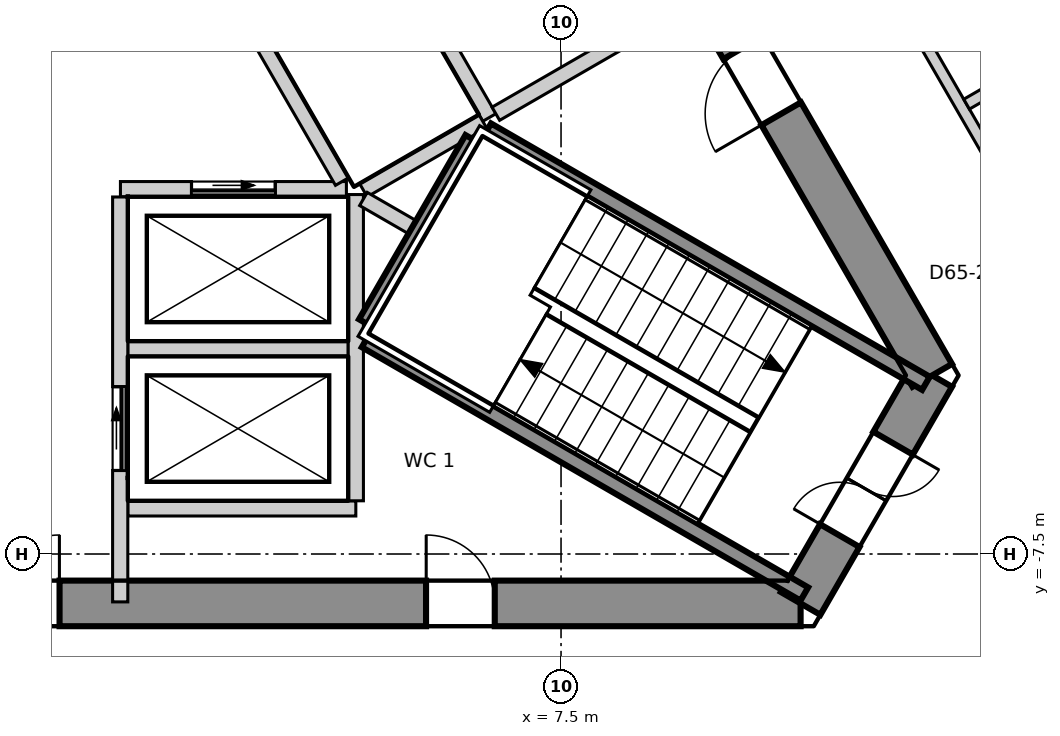
"""IFC4 building model, lengths in metres.
Left out: names, types, materials, properties, quantities, classifications, styles, units other than length and angle.
Written with IfcOpenShell. Run it as: python <this file> out.ifc"""

import sys

from ifc_helpers import new_model, si_unit, direction, frame, frame_2d, origin, place, context, subcontext, project, spatial, polyline, rectangle, outline, extrude, element, fill, save


model = new_model("IFC4")
c1 = context("Model", 3, precision=1e-05, world=origin(), true_north=direction((0.0, 1.0)))
c2 = subcontext(c1, "Body", "Model", "MODEL_VIEW")
j1 = project(units=[si_unit("LENGTHUNIT", "METRE"), si_unit("PLANEANGLEUNIT", "RADIAN")], contexts=[c1])
p1 = place(None, origin())
s1 = spatial("IfcSite", under=j1, at=p1, CompositionType="ELEMENT")
p2 = place(p1, origin())
s2 = spatial("IfcBuilding", under=s1, at=p2, CompositionType="ELEMENT")
p3 = place(p2, frame((0.0, 0.0, 279.1)))
s3 = spatial("IfcBuildingStorey", under=s2, at=p3, CompositionType="ELEMENT", Elevation=279.1)
p4 = place(p3, frame((-10.652, -8.15, -0.3), z_axis=(0.0, 0.0, 1.0), x_axis=(1.0, 0.0, 0.0)))
e1 = element("IfcWall", 1, at=p4, inside=s3, PredefinedType="SHEAR", context=c2, shape_type="SweptSolid", body=[
    extrude(outline(polyline([(-0.173, -0.3), (1.795, -0.3), (3.763, -0.3), (5.731, -0.3), (7.7, -0.3), (9.668, -0.3), (11.636, -0.3), (13.604, -0.3), (15.573, -0.3), (17.541, -0.3), (19.509, -0.3), (21.477, -0.3), (21.131, 0.3), (19.226, 0.3), (17.321, 0.3), (15.415, 0.3), (13.51, 0.3), (11.605, 0.3), (9.699, 0.3), (7.794, 0.3), (5.889, 0.3), (3.984, 0.3), (2.078, 0.3), (0.173, 0.3), (-0.173, -0.3)])), origin(), (0.0, 0.0, 1.0), 3.6),
])
p5 = place(p4, frame((9.752, 0.0, 0.3)))
e2 = element("IfcOpeningElement", 2, at=p5, cuts=e1, PredefinedType="OPENING", context=c2, shape_type="SweptSolid", body=[
    extrude(rectangle(XDim=1.8, YDim=2.1, at=frame_2d((0.9, 1.05))), frame((0.0, 0.31, 0.0), z_axis=(0.0, -1.0, 0.0), x_axis=(1.0, 0.0, 0.0)), (0.0, 0.0, 1.0), 0.62),
])
p6 = place(p4, frame((4.026, 0.0, 0.3)))
e3 = element("IfcOpeningElement", 3, at=p6, cuts=e1, PredefinedType="OPENING", context=c2, shape_type="SweptSolid", body=[
    extrude(rectangle(XDim=0.9, YDim=2.1, at=frame_2d((0.45, 1.05))), frame((0.0, 0.31, 0.0), z_axis=(0.0, -1.0, 0.0), x_axis=(1.0, 0.0, 0.0)), (0.0, 0.0, 1.0), 0.62),
])
p7 = place(p4, frame((16.378, 0.0, 0.3)))
e4 = element("IfcOpeningElement", 4, at=p7, cuts=e1, PredefinedType="OPENING", context=c2, shape_type="SweptSolid", body=[
    extrude(rectangle(XDim=0.9, YDim=2.1, at=frame_2d((0.45, 1.05))), frame((0.0, 0.31, 0.0), z_axis=(0.0, -1.0, 0.0), x_axis=(1.0, 0.0, 0.0)), (0.0, 0.0, 1.0), 0.62),
])
p8 = place(p3, frame((10.652, -8.15, -0.3), z_axis=(0.0, 0.0, 1.0), x_axis=(0.49997462182, 0.866040055388, 0.0)))
e5 = element("IfcWall", 5, at=p8, inside=s3, PredefinedType="SHEAR", context=c2, shape_type="SweptSolid", body=[
    extrude(outline(polyline([(-0.173, -0.3), (1.732, -0.301), (3.638, -0.301), (3.291, 0.3), (1.732, 0.3), (0.173, 0.3), (-0.173, -0.3)])), origin(), (0.0, 0.0, 1.0), 3.6),
])
p9 = place(p8, frame((1.032, 0.0, 0.3)))
e6 = element("IfcOpeningElement", 6, at=p9, cuts=e5, PredefinedType="OPENING", context=c2, shape_type="SweptSolid", body=[
    extrude(rectangle(XDim=1.4, YDim=2.1, at=frame_2d((0.7, 1.05))), frame((0.0, 0.31, 0.0), z_axis=(0.0, -1.0, 0.0), x_axis=(1.0, 0.0, 0.0)), (0.0, 0.0, 1.0), 0.621),
])
p10 = place(p3, frame((12.384, -5.15, -0.3), z_axis=(0.0, 0.0, 1.0), x_axis=(-0.500000539815, 0.866025092122, 0.0)))
e7 = element("IfcWall", 7, at=p10, inside=s3, PredefinedType="SHEAR", context=c2, shape_type="SweptSolid", body=[
    extrude(outline(polyline([(-0.173, -0.301), (1.795, -0.301), (3.763, -0.301), (5.731, -0.301), (7.7, -0.301), (9.668, -0.301), (11.636, -0.301), (13.604, -0.3), (15.573, -0.3), (17.541, -0.3), (19.509, -0.3), (21.477, -0.3), (21.131, 0.3), (19.226, 0.3), (17.321, 0.3), (15.415, 0.3), (13.51, 0.3), (11.605, 0.3), (9.699, 0.3), (7.794, 0.3), (5.889, 0.3), (3.984, 0.3), (2.078, 0.3), (0.173, 0.3), (-0.173, -0.301)])), origin(), (0.0, 0.0, 1.0), 3.6),
])
p11 = place(p10, frame((16.378, 0.0, 0.3)))
e8 = element("IfcOpeningElement", 8, at=p11, cuts=e7, PredefinedType="OPENING", context=c2, shape_type="SweptSolid", body=[
    extrude(rectangle(XDim=0.9, YDim=2.1, at=frame_2d((0.45, 1.05))), frame((0.0, 0.31, 0.0), z_axis=(0.0, -1.0, 0.0), x_axis=(1.0, 0.0, 0.0)), (0.0, 0.0, 1.0), 0.621),
])
p12 = place(p10, frame((3.976, 0.0, 0.3)))
e9 = element("IfcOpeningElement", 9, at=p12, cuts=e7, PredefinedType="OPENING", context=c2, shape_type="SweptSolid", body=[
    extrude(rectangle(XDim=1.0, YDim=2.1, at=frame_2d((0.5, 1.05))), frame((0.0, 0.31, 0.0), z_axis=(0.0, -1.0, 0.0), x_axis=(1.0, 0.0, 0.0)), (0.0, 0.0, 1.0), 0.621),
])
p13 = place(p3, frame((25.791, -11.962, 0.0), z_axis=(0.0, 0.0, 1.0), x_axis=(-0.500006870765, 0.86602143691, 0.0)))
e10 = element("IfcWall", 10, at=p13, inside=s3, PredefinedType="ELEMENTEDWALL", context=c2, shape_type="SweptSolid", body=[
    extrude(rectangle(XDim=46.49, YDim=0.2, at=frame_2d((23.245, 0.0))), origin(), (0.0, 0.0, 1.0), 3.3),
])
p14 = place(p13, frame((2.197, 0.0, 0.9)))
e11 = element("IfcOpeningElement", 11, at=p14, cuts=e10, PredefinedType="OPENING", context=c2, shape_type="SweptSolid", body=[
    extrude(rectangle(XDim=3.7, YDim=2.2, at=frame_2d((1.85, 1.1))), frame((0.0, 0.11, 0.0), z_axis=(0.0, -1.0, 0.0), x_axis=(1.0, 0.0, 0.0)), (0.0, 0.0, 1.0), 0.22),
])
p15 = place(p13, frame((7.685, 0.0, 0.9)))
e12 = element("IfcOpeningElement", 12, at=p15, cuts=e10, PredefinedType="OPENING", context=c2, shape_type="SweptSolid", body=[
    extrude(rectangle(XDim=3.7, YDim=2.2, at=frame_2d((1.85, 1.1))), frame((0.0, 0.11, 0.0), z_axis=(0.0, -1.0, 0.0), x_axis=(1.0, 0.0, 0.0)), (0.0, 0.0, 1.0), 0.22),
])
p16 = place(p13, frame((13.173, 0.0, 0.9)))
e13 = element("IfcOpeningElement", 13, at=p16, cuts=e10, PredefinedType="OPENING", context=c2, shape_type="SweptSolid", body=[
    extrude(rectangle(XDim=3.7, YDim=2.2, at=frame_2d((1.85, 1.1))), frame((0.0, 0.11, 0.0), z_axis=(0.0, -1.0, 0.0), x_axis=(1.0, 0.0, 0.0)), (0.0, 0.0, 1.0), 0.22),
])
p17 = place(p13, frame((18.661, 0.0, 0.9)))
e14 = element("IfcOpeningElement", 14, at=p17, cuts=e10, PredefinedType="OPENING", context=c2, shape_type="SweptSolid", body=[
    extrude(rectangle(XDim=3.7, YDim=2.2, at=frame_2d((1.85, 1.1))), frame((0.0, 0.11, 0.0), z_axis=(0.0, -1.0, 0.0), x_axis=(1.0, 0.0, 0.0)), (0.0, 0.0, 1.0), 0.22),
])
p18 = place(p13, frame((24.149, 0.0, 0.9)))
e15 = element("IfcOpeningElement", 15, at=p18, cuts=e10, PredefinedType="OPENING", context=c2, shape_type="SweptSolid", body=[
    extrude(rectangle(XDim=3.7, YDim=2.2, at=frame_2d((1.85, 1.1))), frame((0.0, 0.11, 0.0), z_axis=(0.0, -1.0, 0.0), x_axis=(1.0, 0.0, 0.0)), (0.0, 0.0, 1.0), 0.22),
])
p19 = place(p13, frame((29.637, 0.0, 0.9)))
e16 = element("IfcOpeningElement", 16, at=p19, cuts=e10, PredefinedType="OPENING", context=c2, shape_type="SweptSolid", body=[
    extrude(rectangle(XDim=3.7, YDim=2.2, at=frame_2d((1.85, 1.1))), frame((0.0, 0.11, 0.0), z_axis=(0.0, -1.0, 0.0), x_axis=(1.0, 0.0, 0.0)), (0.0, 0.0, 1.0), 0.22),
])
p20 = place(p13, frame((35.125, 0.0, 0.9)))
e17 = element("IfcOpeningElement", 17, at=p20, cuts=e10, PredefinedType="OPENING", context=c2, shape_type="SweptSolid", body=[
    extrude(rectangle(XDim=3.7, YDim=2.2, at=frame_2d((1.85, 1.1))), frame((0.0, 0.11, 0.0), z_axis=(0.0, -1.0, 0.0), x_axis=(1.0, 0.0, 0.0)), (0.0, 0.0, 1.0), 0.22),
])
p21 = place(p13, frame((40.613, 0.0, 0.9)))
e18 = element("IfcOpeningElement", 18, at=p21, cuts=e10, PredefinedType="OPENING", context=c2, shape_type="SweptSolid", body=[
    extrude(rectangle(XDim=3.7, YDim=2.2, at=frame_2d((1.85, 1.1))), frame((0.0, 0.11, 0.0), z_axis=(0.0, -1.0, 0.0), x_axis=(1.0, 0.0, 0.0)), (0.0, 0.0, 1.0), 0.22),
])
p22 = place(p3, frame((0.075, 20.37, 0.0), z_axis=(0.0, 0.0, 1.0), x_axis=(0.500003985697, -0.866023102629, 0.0)))
e19 = element("IfcWall", 19, at=p22, inside=s3, PredefinedType="PARTITIONING", context=c2, shape_type="SweptSolid", body=[
    extrude(rectangle(XDim=35.206, YDim=0.15, at=frame_2d((17.603, 0.0))), origin(), (0.0, 0.0, 1.0), 3.3),
])
p23 = place(p22, frame((31.506, 0.0, 0.0)))
e20 = element("IfcOpeningElement", 20, at=p23, cuts=e19, PredefinedType="OPENING", context=c2, shape_type="SweptSolid", body=[
    extrude(rectangle(XDim=1.0, YDim=2.1, at=frame_2d((0.5, 1.05))), frame((0.0, 0.085, 0.0), z_axis=(0.0, -1.0, 0.0), x_axis=(1.0, 0.0, 0.0)), (0.0, 0.0, 1.0), 0.17),
])
p24 = place(p22, frame((26.529, 0.0, 0.0)))
e21 = element("IfcOpeningElement", 21, at=p24, cuts=e19, PredefinedType="OPENING", context=c2, shape_type="SweptSolid", body=[
    extrude(rectangle(XDim=1.0, YDim=2.1, at=frame_2d((0.5, 1.05))), frame((0.0, 0.085, 0.0), z_axis=(0.0, -1.0, 0.0), x_axis=(1.0, 0.0, 0.0)), (0.0, 0.0, 1.0), 0.17),
])
p25 = place(p22, frame((19.442, 0.0, 0.0)))
e22 = element("IfcOpeningElement", 22, at=p25, cuts=e19, PredefinedType="OPENING", context=c2, shape_type="SweptSolid", body=[
    extrude(rectangle(XDim=1.0, YDim=2.1, at=frame_2d((0.5, 1.05))), frame((0.0, 0.085, 0.0), z_axis=(0.0, -1.0, 0.0), x_axis=(1.0, 0.0, 0.0)), (0.0, 0.0, 1.0), 0.17),
])
p26 = place(p22, frame((8.254, 0.0, 0.0)))
e23 = element("IfcOpeningElement", 23, at=p26, cuts=e19, PredefinedType="OPENING", context=c2, shape_type="SweptSolid", body=[
    extrude(rectangle(XDim=1.0, YDim=2.1, at=frame_2d((0.5, 1.05))), frame((0.0, 0.085, 0.0), z_axis=(0.0, -1.0, 0.0), x_axis=(1.0, 0.0, 0.0)), (0.0, 0.0, 1.0), 0.17),
])
p27 = place(p22, frame((13.754, 0.0, 0.0)))
e24 = element("IfcOpeningElement", 24, at=p27, cuts=e19, PredefinedType="OPENING", context=c2, shape_type="SweptSolid", body=[
    extrude(rectangle(XDim=0.9, YDim=2.1, at=frame_2d((0.45, 1.05))), frame((0.0, 0.085, 0.0), z_axis=(0.0, -1.0, 0.0), x_axis=(1.0, 0.0, 0.0)), (0.0, 0.0, 1.0), 0.17),
])
p28 = place(p22, frame((11.554, 0.0, 0.0)))
e25 = element("IfcOpeningElement", 25, at=p28, cuts=e19, PredefinedType="OPENING", context=c2, shape_type="SweptSolid", body=[
    extrude(rectangle(XDim=0.9, YDim=2.1, at=frame_2d((0.45, 1.05))), frame((0.0, 0.085, 0.0), z_axis=(0.0, -1.0, 0.0), x_axis=(1.0, 0.0, 0.0)), (0.0, 0.0, 1.0), 0.17),
])
p29 = place(p22, frame((2.777, 0.0, 0.0)))
e26 = element("IfcOpeningElement", 26, at=p29, cuts=e19, PredefinedType="OPENING", context=c2, shape_type="SweptSolid", body=[
    extrude(rectangle(XDim=1.0, YDim=2.1, at=frame_2d((0.5, 1.05))), frame((0.0, 0.085, 0.0), z_axis=(0.0, -1.0, 0.0), x_axis=(1.0, 0.0, 0.0)), (0.0, 0.0, 1.0), 0.17),
])
p30 = place(p3, frame((12.836, -1.582, 0.0), z_axis=(0.0, 0.0, 1.0), x_axis=(0.865965520905, 0.500103705848, 0.0)))
e27 = element("IfcWall", 27, at=p30, inside=s3, PredefinedType="PARTITIONING", context=c2, shape_type="SweptSolid", body=[
    extrude(rectangle(XDim=2.55, YDim=0.15, at=frame_2d((1.275, 0.0))), origin(), (0.0, 0.0, 1.0), 3.3),
])
p31 = place(p30, frame((0.775, 0.0, 0.0)))
e28 = element("IfcOpeningElement", 28, at=p31, cuts=e27, PredefinedType="OPENING", context=c2, shape_type="SweptSolid", body=[
    extrude(rectangle(XDim=0.9, YDim=2.1, at=frame_2d((0.45, 1.05))), frame((0.0, 0.085, 0.0), z_axis=(0.0, -1.0, 0.0), x_axis=(1.0, 0.0, 0.0)), (0.0, 0.0, 1.0), 0.17),
])
p32 = place(p3, frame((1.8, -4.8, 0.0), z_axis=(0.0, 0.0, 1.0), x_axis=(1.0, 0.0, 0.0)))
e29 = element("IfcWall", 29, at=p32, inside=s3, PredefinedType="SOLIDWALL", context=c2, shape_type="SweptSolid", body=[
    extrude(rectangle(XDim=2.9, YDim=0.2, at=frame_2d((1.45, 0.0))), origin(), (0.0, 0.0, 1.0), 3.3),
])
p33 = place(p3, frame((1.8, -6.9, 0.0), z_axis=(0.0, 0.0, 1.0), x_axis=(1.0, 0.0, 0.0)))
e30 = element("IfcWall", 30, at=p33, inside=s3, PredefinedType="SOLIDWALL", context=c2, shape_type="SweptSolid", body=[
    extrude(rectangle(XDim=3.0, YDim=0.2, at=frame_2d((1.5, 0.0))), origin(), (0.0, 0.0, 1.0), 3.3),
])
p34 = place(p3, frame((1.703, -2.7, 0.0), z_axis=(0.0, 0.0, 1.0), x_axis=(1.0, 0.0, 0.0)))
e31 = element("IfcWall", 31, at=p34, inside=s3, PredefinedType="SOLIDWALL", context=c2, shape_type="SweptSolid", body=[
    extrude(rectangle(XDim=2.973, YDim=0.2, at=frame_2d((1.487, 0.0))), origin(), (0.0, 0.0, 1.0), 3.3),
])
p35 = place(p34, frame((0.936, 0.0, 0.0)))
e32 = element("IfcOpeningElement", 32, at=p35, cuts=e31, PredefinedType="OPENING", context=c2, shape_type="SweptSolid", body=[
    extrude(rectangle(XDim=1.1, YDim=2.1, at=frame_2d((0.55, 1.05))), frame((0.0, 0.11, 0.0), z_axis=(0.0, -1.0, 0.0), x_axis=(1.0, 0.0, 0.0)), (0.0, 0.0, 1.0), 0.22),
])
p36 = place(p3, frame((3.19, -0.125, 0.0), z_axis=(0.0, 0.0, 1.0), x_axis=(0.499988658015, -0.866031951983, 0.0)))
e33 = element("IfcWall", 33, at=p36, inside=s3, PredefinedType="SOLIDWALL", context=c2, shape_type="SweptSolid", body=[
    extrude(rectangle(XDim=2.858, YDim=0.2, at=frame_2d((1.429, 0.0))), origin(), (0.0, 0.0, 1.0), 3.3),
])
p37 = place(p3, frame((1.7, -8.13, 0.0), z_axis=(0.0, 0.0, 1.0), x_axis=(0.0, 1.0, 0.0)))
e34 = element("IfcWall", 34, at=p37, inside=s3, PredefinedType="SOLIDWALL", context=c2, shape_type="SweptSolid", body=[
    extrude(rectangle(XDim=5.327, YDim=0.2, at=frame_2d((2.664, 0.0))), origin(), (0.0, 0.0, 1.0), 3.3),
])
p38 = place(p37, frame((1.73, 0.0, 0.0)))
e35 = element("IfcOpeningElement", 35, at=p38, cuts=e34, PredefinedType="OPENING", context=c2, shape_type="SweptSolid", body=[
    extrude(rectangle(XDim=1.1, YDim=2.1, at=frame_2d((0.55, 1.05))), frame((0.0, 0.11, 0.0), z_axis=(0.0, -1.0, 0.0), x_axis=(1.0, 0.0, 0.0)), (0.0, 0.0, 1.0), 0.22),
])
p39 = place(p3, frame((4.8, -6.8, 0.0), z_axis=(0.0, 0.0, 1.0), x_axis=(0.0, 1.0, 0.0)))
e36 = element("IfcWall", 36, at=p39, inside=s3, PredefinedType="SOLIDWALL", context=c2, shape_type="SweptSolid", body=[
    extrude(rectangle(XDim=4.029, YDim=0.2, at=frame_2d((2.015, 0.0))), origin(), (0.0, 0.0, 1.0), 3.3),
])
p40 = place(p3, frame((5.057, 0.841, 0.0), z_axis=(0.0, 0.0, 1.0), x_axis=(0.499990139034, -0.866031096941, 0.0)))
e37 = element("IfcWall", 37, at=p40, inside=s3, PredefinedType="SOLIDWALL", context=c2, shape_type="SweptSolid", body=[
    extrude(rectangle(XDim=3.0, YDim=0.2, at=frame_2d((1.5, 0.0))), origin(), (0.0, 0.0, 1.0), 3.3),
])
p41 = place(p3, frame((4.9, -2.714, 0.0), z_axis=(0.0, 0.0, 1.0), x_axis=(0.865846928409, 0.500309001083, 0.0)))
e38 = element("IfcWall", 38, at=p41, inside=s3, PredefinedType="SOLIDWALL", context=c2, shape_type="SweptSolid", body=[
    extrude(rectangle(XDim=1.813, YDim=0.2, at=frame_2d((0.907, 0.0))), origin(), (0.0, 0.0, 1.0), 3.3),
])
p42 = place(p3, frame((4.9, -2.829, 0.0), z_axis=(0.0, 0.0, 1.0), x_axis=(0.866273177064, -0.499570598314, 0.0)))
e39 = element("IfcWall", 39, at=p42, inside=s3, PredefinedType="SOLIDWALL", context=c2, shape_type="SweptSolid", body=[
    extrude(rectangle(XDim=0.742, YDim=0.2, at=frame_2d((0.371, 0.0))), origin(), (0.0, 0.0, 1.0), 3.3),
])
p43 = place(p3, frame((6.642, -1.708, 0.0), z_axis=(0.0, 0.0, 1.0), x_axis=(0.866043441391, 0.499968756647, 0.0)))
e40 = element("IfcWall", 40, at=p43, inside=s3, PredefinedType="SOLIDWALL", context=c2, shape_type="SweptSolid", body=[
    extrude(rectangle(XDim=2.002, YDim=0.2, at=frame_2d((1.001, 0.0))), origin(), (0.0, 0.0, 1.0), 3.3),
])
p44 = place(p3, frame((4.929, -4.462, 0.0), z_axis=(0.0, 0.0, 1.0), x_axis=(0.500200581029, 0.865909567298, 0.0)))
e41 = element("IfcWall", 41, at=p44, inside=s3, PredefinedType="SOLIDWALL", context=c2, shape_type="SweptSolid", body=[
    extrude(rectangle(XDim=2.799, YDim=0.2, at=frame_2d((1.399, 0.0))), origin(), (0.0, 0.0, 1.0), 3.3),
])
p45 = place(p3, frame((6.529, -1.922, 0.0), z_axis=(0.0, 0.0, 1.0), x_axis=(0.866068467981, -0.499925403204, 0.0)))
e42 = element("IfcWall", 42, at=p45, inside=s3, PredefinedType="SOLIDWALL", context=c2, shape_type="SweptSolid", body=[
    extrude(rectangle(XDim=6.665, YDim=0.2, at=frame_2d((3.332, 0.0))), origin(), (0.0, 0.0, 1.0), 3.3),
])
p46 = place(p3, frame((4.929, -4.693, 0.0), z_axis=(0.0, 0.0, 1.0), x_axis=(0.866005022404, -0.500035299925, 0.0)))
e43 = element("IfcWall", 43, at=p46, inside=s3, PredefinedType="SOLIDWALL", context=c2, shape_type="SweptSolid", body=[
    extrude(rectangle(XDim=6.665, YDim=0.2, at=frame_2d((3.333, 0.0))), origin(), (0.0, 0.0, 1.0), 3.3),
])
p47 = place(p35, origin())
e44 = element("IfcDoor", 44, at=p47, inside=s3, OperationType="SLIDING_TO_LEFT", PredefinedType="DOOR", context=c2, shape_type="SweptSolid", body=[
    extrude(rectangle(XDim=1.1, YDim=2.1, at=frame_2d((0.55, 1.05))), frame((0.0, 0.025, 0.0), z_axis=(0.0, -1.0, 0.0), x_axis=(1.0, 0.0, 0.0)), (0.0, 0.0, 1.0), 0.05),
])
fill(e32, e44)
p48 = place(p38, origin())
e45 = element("IfcDoor", 45, at=p48, inside=s3, OperationType="SLIDING_TO_LEFT", PredefinedType="DOOR", context=c2, shape_type="SweptSolid", body=[
    extrude(rectangle(XDim=1.1, YDim=2.1, at=frame_2d((0.55, 1.05))), frame((0.0, 0.025, 0.0), z_axis=(0.0, -1.0, 0.0), x_axis=(1.0, 0.0, 0.0)), (0.0, 0.0, 1.0), 0.05),
])
fill(e35, e45)
p49 = place(p5, origin())
e46 = element("IfcDoor", 46, at=p49, inside=s3, OperationType="DOUBLE_DOOR_SINGLE_SWING", PredefinedType="DOOR", context=c2, shape_type="SweptSolid", body=[
    extrude(rectangle(XDim=1.8, YDim=2.1, at=frame_2d((0.9, 1.05))), frame((0.0, 0.025, 0.0), z_axis=(0.0, -1.0, 0.0), x_axis=(1.0, 0.0, 0.0)), (0.0, 0.0, 1.0), 0.05),
])
fill(e2, e46)
p50 = place(p9, origin())
e47 = element("IfcDoor", 47, at=p50, inside=s3, OperationType="DOUBLE_DOOR_SINGLE_SWING", PredefinedType="DOOR", context=c2, shape_type="SweptSolid", body=[
    extrude(rectangle(XDim=1.4, YDim=2.1, at=frame_2d((0.7, 1.05))), frame((0.0, 0.025, 0.0), z_axis=(0.0, -1.0, 0.0), x_axis=(1.0, 0.0, 0.0)), (0.0, 0.0, 1.0), 0.05),
])
fill(e6, e47)
p51 = place(p7, origin())
e48 = element("IfcDoor", 48, at=p51, inside=s3, OperationType="SINGLE_SWING_RIGHT", PredefinedType="DOOR", context=c2, shape_type="SweptSolid", body=[
    extrude(rectangle(XDim=0.9, YDim=2.1, at=frame_2d((0.45, 1.05))), frame((0.0, 0.025, 0.0), z_axis=(0.0, -1.0, 0.0), x_axis=(1.0, 0.0, 0.0)), (0.0, 0.0, 1.0), 0.05),
])
fill(e4, e48)
p52 = place(p12, origin())
e49 = element("IfcDoor", 49, at=p52, inside=s3, OperationType="SINGLE_SWING_RIGHT", PredefinedType="DOOR", context=c2, shape_type="SweptSolid", body=[
    extrude(rectangle(XDim=1.0, YDim=2.1, at=frame_2d((0.5, 1.05))), frame((0.0, 0.025, 0.0), z_axis=(0.0, -1.0, 0.0), x_axis=(1.0, 0.0, 0.0)), (0.0, 0.0, 1.0), 0.05),
])
fill(e9, e49)
save(model, sys.argv[1])
